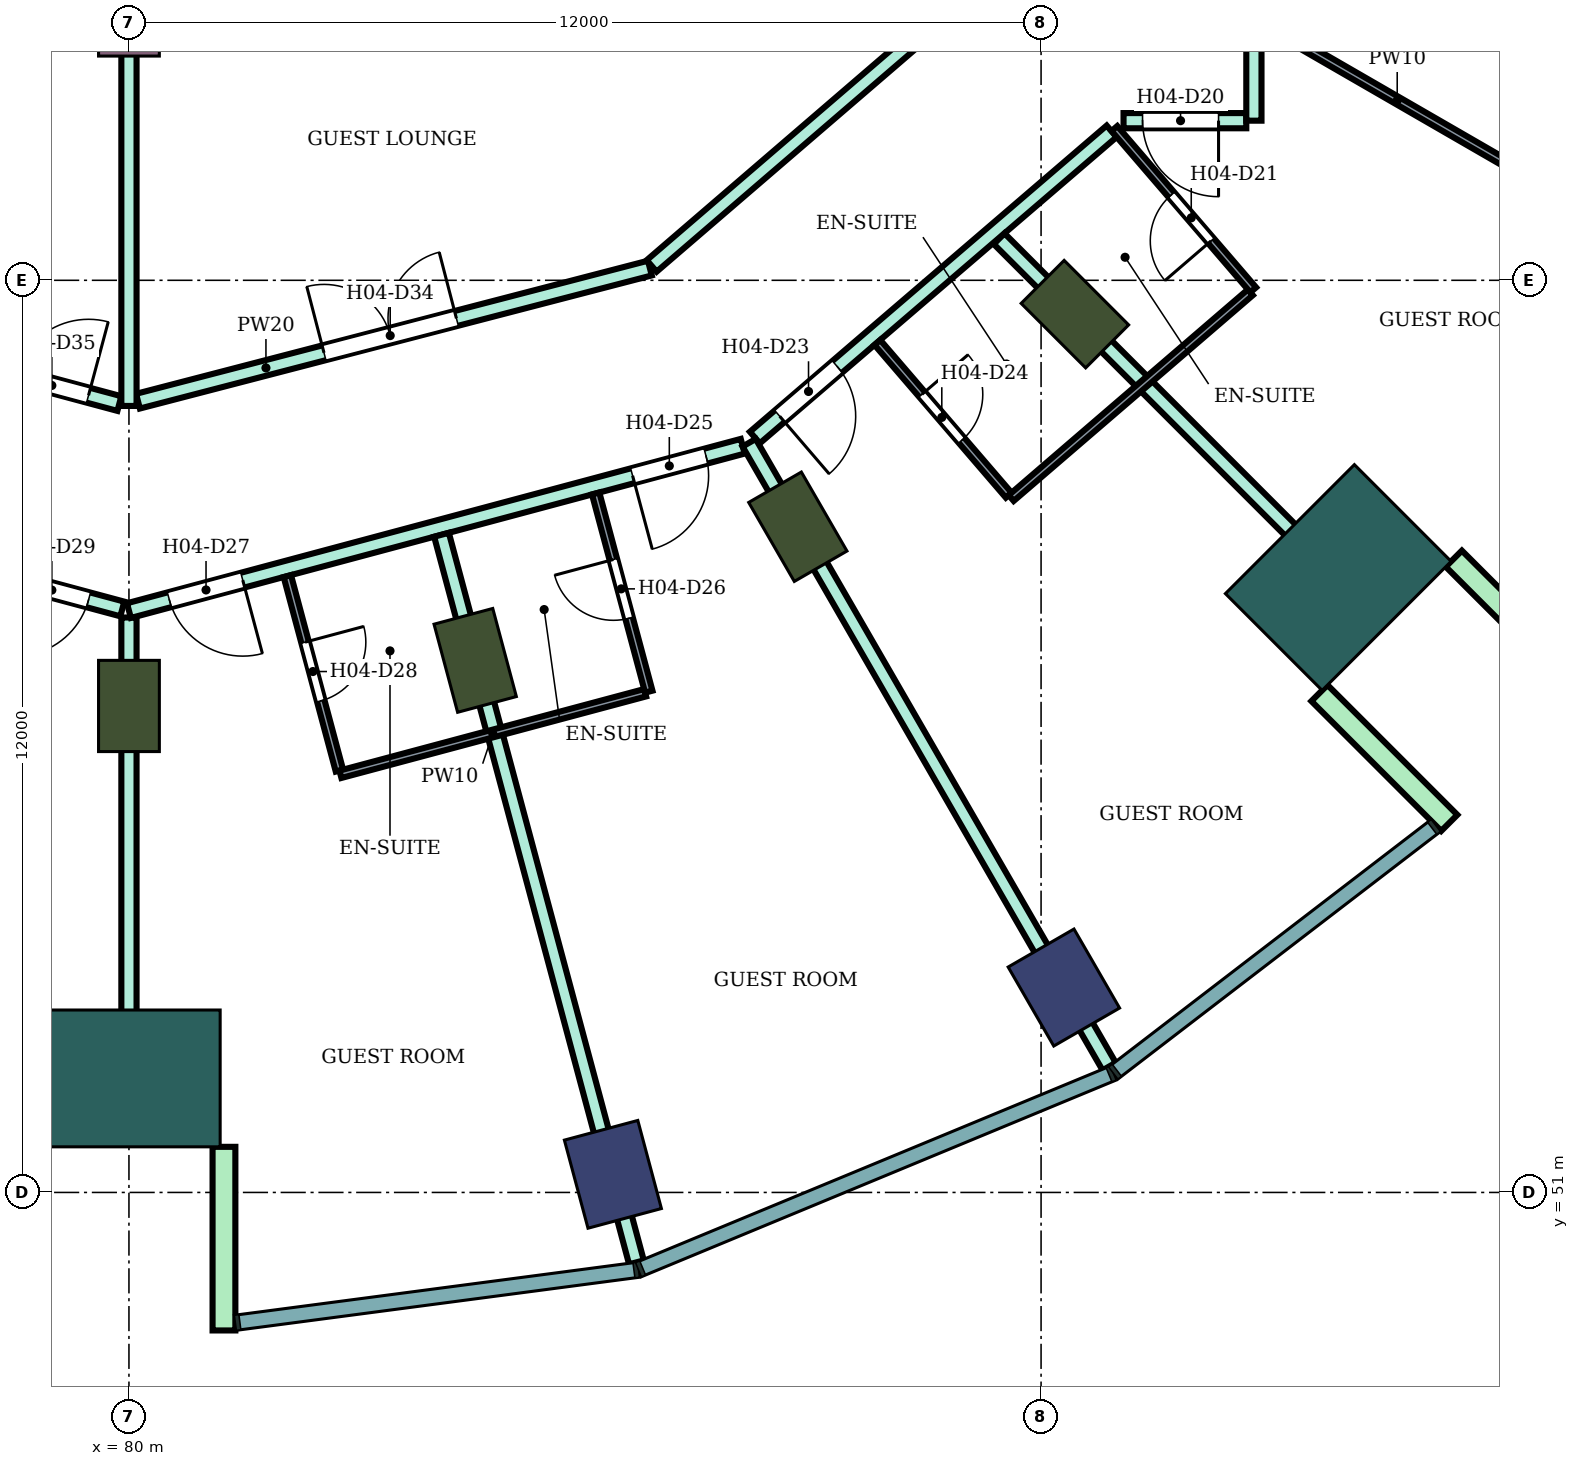
"""IFC4 building model, lengths in metres.
Left out: names, types, materials, properties, quantities, classifications, styles, units other than length and angle.
Written with IfcOpenShell. Run it as: python <this file> out.ifc"""

import sys

from ifc_helpers import new_model, si_unit, direction, frame, frame_2d, origin, origin_2d, place, context, subcontext, project, spatial, rectangle, extrude, element, fill, save


model = new_model("IFC4")
c1 = context("Model", 3, precision=1e-05, world=origin(), true_north=direction((0.0, 1.0)))
c2 = subcontext(c1, "Body", "Model", "MODEL_VIEW")
j1 = project(units=[si_unit("LENGTHUNIT", "METRE"), si_unit("PLANEANGLEUNIT", "RADIAN")], contexts=[c1])
p1 = place(None, origin())
s1 = spatial("IfcSite", under=j1, at=p1, CompositionType="ELEMENT")
p2 = place(p1, origin())
s2 = spatial("IfcBuilding", under=s1, at=p2, CompositionType="ELEMENT")
p3 = place(p2, frame((0.0, 0.0, 63.0)))
s3 = spatial("IfcBuildingStorey", under=s2, at=p3, CompositionType="ELEMENT", Elevation=63.0)
for number, where, z_axis, x_axis in (
    (1, (86.367, 51.238, 0.0), (0.0, 0.0, 1.0), (0.259, -0.966, 0.0)),
    (2, (92.3, 53.696, 0.0), (0.0, 0.0, 1.0), (0.5, -0.866, 0.0)),
):
    element("IfcColumn", number, at=place(p3, frame(where, z_axis=z_axis, x_axis=x_axis)), inside=s3, PredefinedType="COLUMN", context=c2, shape_type="SweptSolid", body=[
        extrude(rectangle(XDim=1.2, YDim=1.0, at=origin_2d()), origin(), (0.0, 0.0, 1.0), 3.8),
    ])
for number, where, z_axis, x_axis in (
    (3, (80.0, 57.4, 0.0), (0.0, 0.0, 1.0), (0.0, -1.0, 0.0)),
    (4, (84.555, 58.0, 0.0), (0.0, 0.0, 1.0), (0.259, -0.966, 0.0)),
    (5, (88.8, 59.758, 0.0), (0.0, 0.0, 1.0), (0.5, -0.866, 0.0)),
    (6, (92.445, 62.555, 0.0), (0.0, 0.0, 1.0), (0.707, -0.707, 0.0)),
):
    element("IfcColumn", number, at=place(p3, frame(where, z_axis=z_axis, x_axis=x_axis)), inside=s3, PredefinedType="COLUMN", context=c2, shape_type="SweptSolid", body=[
        extrude(rectangle(XDim=1.2, YDim=0.8, at=origin_2d()), origin(), (0.0, 0.0, 1.0), 3.8),
    ])
p4 = place(p3, frame((80.0, 66.4, 0.0), z_axis=(0.0, 0.0, 1.0), x_axis=(0.0, -1.0, 0.0)))
e7 = element("IfcColumn", 7, at=p4, inside=s3, PredefinedType="COLUMN", context=c2, shape_type="SweptSolid", body=[
    extrude(rectangle(XDim=0.9, YDim=0.8, at=origin_2d()), origin(), (0.0, 0.0, 1.0), 3.8),
])
for number, where, z_axis, x_axis in (
    (8, (80.0, 52.5, 0.0), (0.0, 0.0, 1.0), (0.0, -1.0, 0.0)),
    (9, (95.91, 59.09, 0.0), (0.0, 0.0, 1.0), (0.707, -0.707, 0.0)),
):
    element("IfcColumn", number, at=place(p3, frame(where, z_axis=z_axis, x_axis=x_axis)), inside=s3, PredefinedType="COLUMN", context=c2, shape_type="SweptSolid", body=[
        extrude(rectangle(XDim=1.8, YDim=2.4, at=origin_2d()), origin(), (0.0, 0.0, 1.0), 3.8),
    ])
for number, where, z_axis, x_axis in (
    (10, (81.25, 51.6, 0.0), (0.0, 0.0, 1.0), (0.0, -1.0, 0.0)),
    (11, (95.662, 57.57, 0.0), (0.0, 0.0, 1.0), (0.707, -0.707, 0.0)),
    (12, (97.43, 59.338, 0.0), (0.0, 0.0, 1.0), (0.707, -0.707, 0.0)),
):
    element("IfcWall", number, at=place(p3, frame(where, z_axis=z_axis, x_axis=x_axis)), inside=s3, PredefinedType="NOTDEFINED", context=c2, shape_type="SweptSolid", body=[
        extrude(rectangle(XDim=2.416, YDim=0.3, at=frame_2d((1.208, 0.0))), origin(), (0.0, 0.0, 1.0), 3.8),
    ])
p5 = place(p3, frame((71.877, 60.832, 0.0), z_axis=(0.0, 0.0, 1.0), x_axis=(0.965852509869, -0.259092510851, 0.0)))
e13 = element("IfcWall", 13, at=p5, inside=s3, PredefinedType="PARTITIONING", context=c2, shape_type="SweptSolid", body=[
    extrude(rectangle(XDim=8.32, YDim=0.2, at=frame_2d((4.16, 0.0))), origin(), (0.0, 0.0, 1.0), 3.35),
])
p6 = place(p5, frame((6.86, 0.0, 0.0)))
e14 = element("IfcOpeningElement", 14, at=p6, cuts=e13, PredefinedType="OPENING", context=c2, shape_type="SweptSolid", body=[
    extrude(rectangle(XDim=1.0, YDim=2.1, at=frame_2d((0.5, 1.05))), frame((0.0, 0.11, 0.0), z_axis=(0.0, -1.0, 0.0), x_axis=(1.0, 0.0, 0.0)), (0.0, 0.0, 1.0), 0.22),
])
p7 = place(p5, frame((0.55, 0.0, 0.0)))
e15 = element("IfcOpeningElement", 15, at=p7, cuts=e13, PredefinedType="OPENING", context=c2, shape_type="SweptSolid", body=[
    extrude(rectangle(XDim=1.0, YDim=2.1, at=frame_2d((0.5, 1.05))), frame((0.0, 0.11, 0.0), z_axis=(0.0, -1.0, 0.0), x_axis=(1.0, 0.0, 0.0)), (0.0, 0.0, 1.0), 0.22),
])
p8 = place(p3, frame((73.297, 63.143, 0.0), z_axis=(0.0, 0.0, 1.0), x_axis=(0.965859030528, -0.25906820173, 0.0)))
e16 = element("IfcWall", 16, at=p8, inside=s3, PredefinedType="PARTITIONING", context=c2, shape_type="SweptSolid", body=[
    extrude(rectangle(XDim=6.81, YDim=0.2, at=frame_2d((3.405, 0.0))), origin(), (0.0, 0.0, 1.0), 3.35),
])
p9 = place(p8, frame((5.39, 0.0, 0.0)))
e17 = element("IfcOpeningElement", 17, at=p9, cuts=e16, PredefinedType="OPENING", context=c2, shape_type="SweptSolid", body=[
    extrude(rectangle(XDim=1.0, YDim=2.1, at=frame_2d((0.5, 1.05))), frame((0.0, 0.11, 0.0), z_axis=(0.0, -1.0, 0.0), x_axis=(1.0, 0.0, 0.0)), (0.0, 0.0, 1.0), 0.22),
])
p10 = place(p3, frame((80.119, 61.41, 0.0), z_axis=(0.0, 0.0, 1.0), x_axis=(0.967823361235, 0.251630565408, 0.0)))
e18 = element("IfcWall", 18, at=p10, inside=s3, PredefinedType="PARTITIONING", context=c2, shape_type="SweptSolid", body=[
    extrude(rectangle(XDim=6.958, YDim=0.2, at=frame_2d((3.479, 0.0))), origin(), (0.0, 0.0, 1.0), 3.35),
])
p11 = place(p10, frame((2.529, 0.0, 0.0)))
e19 = element("IfcOpeningElement", 19, at=p11, cuts=e18, PredefinedType="OPENING", context=c2, shape_type="SweptSolid", body=[
    extrude(rectangle(XDim=1.8, YDim=2.1, at=frame_2d((0.9, 1.05))), frame((0.0, 0.11, 0.0), z_axis=(0.0, -1.0, 0.0), x_axis=(1.0, 0.0, 0.0)), (0.0, 0.0, 1.0), 0.22),
])
p12 = place(p3, frame((80.0, 51.8, 0.0), z_axis=(0.0, 0.0, 1.0), x_axis=(0.0, 1.0, 0.0)))
e20 = element("IfcWall", 20, at=p12, inside=s3, PredefinedType="PARTITIONING", context=c2, shape_type="SweptSolid", body=[
    extrude(rectangle(XDim=6.764, YDim=0.2, at=frame_2d((3.382, 0.0))), origin(), (0.0, 0.0, 1.0), 3.35),
])
p13 = place(p3, frame((80.0, 58.655, 0.0), z_axis=(0.0, 0.0, 1.0), x_axis=(0.965974635626, 0.258636817424, 0.0)))
e21 = element("IfcWall", 21, at=p13, inside=s3, PredefinedType="PARTITIONING", context=c2, shape_type="SweptSolid", body=[
    extrude(rectangle(XDim=8.36, YDim=0.2, at=frame_2d((4.18, 0.0))), origin(), (0.0, 0.0, 1.0), 3.35),
])
p14 = place(p13, frame((6.86, 0.0, 0.0)))
e22 = element("IfcOpeningElement", 22, at=p14, cuts=e21, PredefinedType="OPENING", context=c2, shape_type="SweptSolid", body=[
    extrude(rectangle(XDim=1.0, YDim=2.1, at=frame_2d((0.5, 1.05))), frame((0.0, 0.11, 0.0), z_axis=(0.0, -1.0, 0.0), x_axis=(1.0, 0.0, 0.0)), (0.0, 0.0, 1.0), 0.22),
])
p15 = place(p13, frame((0.55, 0.0, 0.0)))
e23 = element("IfcOpeningElement", 23, at=p15, cuts=e21, PredefinedType="OPENING", context=c2, shape_type="SweptSolid", body=[
    extrude(rectangle(XDim=1.0, YDim=2.1, at=frame_2d((0.5, 1.05))), frame((0.0, 0.11, 0.0), z_axis=(0.0, -1.0, 0.0), x_axis=(1.0, 0.0, 0.0)), (0.0, 0.0, 1.0), 0.22),
])
p16 = place(p3, frame((80.0, 61.347, 0.0), z_axis=(0.0, 0.0, 1.0), x_axis=(0.0, 1.0, 0.0)))
e24 = element("IfcWall", 24, at=p16, inside=s3, PredefinedType="PARTITIONING", context=c2, shape_type="SweptSolid", body=[
    extrude(rectangle(XDim=5.953, YDim=0.2, at=frame_2d((2.977, 0.0))), origin(), (0.0, 0.0, 1.0), 3.35),
])
p17 = place(p3, frame((84.112, 59.652, 0.0), z_axis=(0.0, 0.0, 1.0), x_axis=(0.258791091927, -0.965933315886, 0.0)))
e25 = element("IfcWall", 25, at=p17, inside=s3, PredefinedType="PARTITIONING", context=c2, shape_type="SweptSolid", body=[
    extrude(rectangle(XDim=9.909, YDim=0.2, at=frame_2d((4.955, 0.0))), origin(), (0.0, 0.0, 1.0), 3.35),
])
p18 = place(p3, frame((86.877, 63.189, 0.0), z_axis=(0.0, 0.0, 1.0), x_axis=(0.758088707506, 0.652151448325, 0.0)))
e26 = element("IfcWall", 26, at=p18, inside=s3, PredefinedType="PARTITIONING", context=c2, shape_type="SweptSolid", body=[
    extrude(rectangle(XDim=5.229, YDim=0.2, at=frame_2d((2.615, 0.0))), origin(), (0.0, 0.0, 1.0), 3.35),
])
p19 = place(p3, frame((88.235, 60.931, 0.0), z_axis=(0.0, 0.0, 1.0), x_axis=(0.758799498714, 0.651324282329, 0.0)))
e27 = element("IfcWall", 27, at=p19, inside=s3, PredefinedType="PARTITIONING", context=c2, shape_type="SweptSolid", body=[
    extrude(rectangle(XDim=6.186, YDim=0.2, at=frame_2d((3.093, 0.0))), origin(), (0.0, 0.0, 1.0), 3.35),
])
p20 = place(p19, frame((0.43, 0.0, 0.0)))
e28 = element("IfcOpeningElement", 28, at=p20, cuts=e27, PredefinedType="OPENING", context=c2, shape_type="SweptSolid", body=[
    extrude(rectangle(XDim=1.0, YDim=2.1, at=frame_2d((0.5, 1.05))), frame((0.0, 0.11, 0.0), z_axis=(0.0, -1.0, 0.0), x_axis=(1.0, 0.0, 0.0)), (0.0, 0.0, 1.0), 0.22),
])
p21 = place(p3, frame((88.159, 60.863, 0.0), z_axis=(0.0, 0.0, 1.0), x_axis=(0.499935840196, -0.866062443296, 0.0)))
e29 = element("IfcWall", 29, at=p21, inside=s3, PredefinedType="PARTITIONING", context=c2, shape_type="SweptSolid", body=[
    extrude(rectangle(XDim=9.475, YDim=0.2, at=frame_2d((4.737, 0.0))), origin(), (0.0, 0.0, 1.0), 3.35),
])
p22 = place(p3, frame((91.448, 63.547, 0.0), z_axis=(0.0, 0.0, 1.0), x_axis=(0.706984810649, -0.707228730688, 0.0)))
e30 = element("IfcWall", 30, at=p22, inside=s3, PredefinedType="PARTITIONING", context=c2, shape_type="SweptSolid", body=[
    extrude(rectangle(XDim=7.006, YDim=0.2, at=frame_2d((3.503, 0.0))), origin(), (0.0, 0.0, 1.0), 3.35),
])
p23 = place(p3, frame((93.085, 65.1, 0.0), z_axis=(0.0, 0.0, 1.0), x_axis=(1.0, 0.0, 0.0)))
e31 = element("IfcWall", 31, at=p23, inside=s3, PredefinedType="PARTITIONING", context=c2, shape_type="SweptSolid", body=[
    extrude(rectangle(XDim=1.615, YDim=0.2, at=frame_2d((0.808, 0.0))), origin(), (0.0, 0.0, 1.0), 3.35),
])
p24 = place(p23, frame((0.25, 0.0, 0.0)))
e32 = element("IfcOpeningElement", 32, at=p24, cuts=e31, PredefinedType="OPENING", context=c2, shape_type="SweptSolid", body=[
    extrude(rectangle(XDim=1.0, YDim=2.1, at=frame_2d((0.5, 1.05))), frame((0.0, 0.11, 0.0), z_axis=(0.0, -1.0, 0.0), x_axis=(1.0, 0.0, 0.0)), (0.0, 0.0, 1.0), 0.22),
])
p25 = place(p3, frame((94.8, 65.1, 0.0), z_axis=(0.0, 0.0, 1.0), x_axis=(0.0, 1.0, 0.0)))
e33 = element("IfcWall", 33, at=p25, inside=s3, PredefinedType="PARTITIONING", context=c2, shape_type="SweptSolid", body=[
    extrude(rectangle(XDim=1.25, YDim=0.2, at=frame_2d((0.625, 0.0))), origin(), (0.0, 0.0, 1.0), 3.35),
])
p26 = place(p3, frame((82.084, 59.108, 0.0), z_axis=(0.0, 0.0, 1.0), x_axis=(0.258591746437, -0.965986702121, 0.0)))
e34 = element("IfcWall", 34, at=p26, inside=s3, PredefinedType="PARTITIONING", context=c2, shape_type="SweptSolid", body=[
    extrude(rectangle(XDim=2.649, YDim=0.1, at=frame_2d((1.325, 0.0))), origin(), (0.0, 0.0, 1.0), 3.35),
])
p27 = place(p26, frame((0.9, 0.0, 0.0)))
e35 = element("IfcOpeningElement", 35, at=p27, cuts=e34, PredefinedType="OPENING", context=c2, shape_type="SweptSolid", body=[
    extrude(rectangle(XDim=0.8, YDim=2.1, at=frame_2d((0.4, 1.05))), frame((0.0, 0.06, 0.0), z_axis=(0.0, -1.0, 0.0), x_axis=(1.0, 0.0, 0.0)), (0.0, 0.0, 1.0), 0.12),
])
p28 = place(p3, frame((82.782, 56.501, 0.0), z_axis=(0.0, 0.0, 1.0), x_axis=(0.965999228418, 0.258544949083, 0.0)))
e36 = element("IfcWall", 36, at=p28, inside=s3, PredefinedType="PARTITIONING", context=c2, shape_type="SweptSolid", body=[
    extrude(rectangle(XDim=4.15, YDim=0.1, at=frame_2d((2.075, 0.0))), origin(), (0.0, 0.0, 1.0), 3.35),
])
p29 = place(p3, frame((86.14, 60.196, 0.0), z_axis=(0.0, 0.0, 1.0), x_axis=(0.258945475746, -0.965891940432, 0.0)))
e37 = element("IfcWall", 37, at=p29, inside=s3, PredefinedType="PARTITIONING", context=c2, shape_type="SweptSolid", body=[
    extrude(rectangle(XDim=2.7, YDim=0.1, at=frame_2d((1.35, 0.0))), origin(), (0.0, 0.0, 1.0), 3.35),
])
p30 = place(p29, frame((0.9, 0.0, 0.0)))
e38 = element("IfcOpeningElement", 38, at=p30, cuts=e37, PredefinedType="OPENING", context=c2, shape_type="SweptSolid", body=[
    extrude(rectangle(XDim=0.8, YDim=2.1, at=frame_2d((0.4, 1.05))), frame((0.0, 0.06, 0.0), z_axis=(0.0, -1.0, 0.0), x_axis=(1.0, 0.0, 0.0)), (0.0, 0.0, 1.0), 0.12),
])
p31 = place(p3, frame((89.846, 62.182, 0.0), z_axis=(0.0, 0.0, 1.0), x_axis=(0.652095405055, -0.758136915541, 0.0)))
e39 = element("IfcWall", 39, at=p31, inside=s3, PredefinedType="PARTITIONING", context=c2, shape_type="SweptSolid", body=[
    extrude(rectangle(XDim=2.65, YDim=0.1, at=frame_2d((1.325, 0.0))), origin(), (0.0, 0.0, 1.0), 3.35),
])
p32 = place(p31, frame((0.9, 0.0, 0.0)))
e40 = element("IfcOpeningElement", 40, at=p32, cuts=e39, PredefinedType="OPENING", context=c2, shape_type="SweptSolid", body=[
    extrude(rectangle(XDim=0.8, YDim=2.1, at=frame_2d((0.4, 1.05))), frame((0.0, 0.06, 0.0), z_axis=(0.0, -1.0, 0.0), x_axis=(1.0, 0.0, 0.0)), (0.0, 0.0, 1.0), 0.12),
])
p33 = place(p3, frame((91.607, 60.135, 0.0), z_axis=(0.0, 0.0, 1.0), x_axis=(0.758121792225, 0.65211298726, 0.0)))
e41 = element("IfcWall", 41, at=p33, inside=s3, PredefinedType="PARTITIONING", context=c2, shape_type="SweptSolid", body=[
    extrude(rectangle(XDim=4.15, YDim=0.1, at=frame_2d((2.075, 0.0))), origin(), (0.0, 0.0, 1.0), 3.35),
])
p34 = place(p3, frame((92.965, 64.997, 0.0), z_axis=(0.0, 0.0, 1.0), x_axis=(0.652104424393, -0.758129157655, 0.0)))
e42 = element("IfcWall", 42, at=p34, inside=s3, PredefinedType="PARTITIONING", context=c2, shape_type="SweptSolid", body=[
    extrude(rectangle(XDim=2.8, YDim=0.1, at=frame_2d((1.4, 0.0))), origin(), (0.0, 0.0, 1.0), 3.35),
])
p35 = place(p34, frame((1.15, 0.0, 0.0)))
e43 = element("IfcOpeningElement", 43, at=p35, cuts=e42, PredefinedType="OPENING", context=c2, shape_type="SweptSolid", body=[
    extrude(rectangle(XDim=0.8, YDim=2.1, at=frame_2d((0.4, 1.05))), frame((0.0, 0.06, 0.0), z_axis=(0.0, -1.0, 0.0), x_axis=(1.0, 0.0, 0.0)), (0.0, 0.0, 1.0), 0.12),
])
p36 = place(p3, frame((94.8, 66.455, 0.0), z_axis=(0.0, 0.0, 1.0), x_axis=(0.86602264145, -0.500004784474, 0.0)))
e44 = element("IfcWall", 44, at=p36, inside=s3, PredefinedType="PARTITIONING", context=c2, shape_type="SweptSolid", body=[
    extrude(rectangle(XDim=8.708, YDim=0.1, at=frame_2d((4.354, 0.0))), origin(), (0.0, 0.0, 1.0), 3.35),
])
p37 = place(p36, frame((3.879, 0.0, 0.0)))
e45 = element("IfcOpeningElement", 45, at=p37, cuts=e44, PredefinedType="OPENING", context=c2, shape_type="SweptSolid", body=[
    extrude(rectangle(XDim=0.9, YDim=2.1, at=frame_2d((0.45, 1.05))), frame((0.0, 0.06, 0.0), z_axis=(0.0, -1.0, 0.0), x_axis=(1.0, 0.0, 0.0)), (0.0, 0.0, 1.0), 0.12),
])
p38 = place(p24, frame((1.0, 0.0, 0.0), z_axis=(0.0, 0.0, 1.0), x_axis=(-1.0, 0.0, 0.0)))
e46 = element("IfcDoor", 46, at=p38, inside=s3, OperationType="SINGLE_SWING_LEFT", PredefinedType="DOOR", context=c2, shape_type="SweptSolid", body=[
    extrude(rectangle(XDim=1.0, YDim=2.1, at=frame_2d((0.5, 1.05))), frame((0.0, 0.025, 0.0), z_axis=(0.0, -1.0, 0.0), x_axis=(1.0, 0.0, 0.0)), (0.0, 0.0, 1.0), 0.05),
])
fill(e32, e46)
p39 = place(p35, frame((0.8, 0.0, 0.0), z_axis=(0.0, 0.0, 1.0), x_axis=(-1.0, 0.0, 0.0)))
e47 = element("IfcDoor", 47, at=p39, inside=s3, OperationType="SINGLE_SWING_LEFT", PredefinedType="DOOR", context=c2, shape_type="SweptSolid", body=[
    extrude(rectangle(XDim=0.8, YDim=2.1, at=frame_2d((0.4, 1.05))), frame((0.0, 0.025, 0.0), z_axis=(0.0, -1.0, 0.0), x_axis=(1.0, 0.0, 0.0)), (0.0, 0.0, 1.0), 0.05),
])
fill(e43, e47)
p40 = place(p20, frame((1.0, 0.0, 0.0), z_axis=(0.0, 0.0, 1.0), x_axis=(-1.0, 0.0, 0.0)))
e48 = element("IfcDoor", 48, at=p40, inside=s3, OperationType="SINGLE_SWING_RIGHT", PredefinedType="DOOR", context=c2, shape_type="SweptSolid", body=[
    extrude(rectangle(XDim=1.0, YDim=2.1, at=frame_2d((0.5, 1.05))), frame((0.0, 0.025, 0.0), z_axis=(0.0, -1.0, 0.0), x_axis=(1.0, 0.0, 0.0)), (0.0, 0.0, 1.0), 0.05),
])
fill(e28, e48)
p41 = place(p32, origin())
e49 = element("IfcDoor", 49, at=p41, inside=s3, OperationType="SINGLE_SWING_LEFT", PredefinedType="DOOR", context=c2, shape_type="SweptSolid", body=[
    extrude(rectangle(XDim=0.8, YDim=2.1, at=frame_2d((0.4, 1.05))), frame((0.0, 0.025, 0.0), z_axis=(0.0, -1.0, 0.0), x_axis=(1.0, 0.0, 0.0)), (0.0, 0.0, 1.0), 0.05),
])
fill(e40, e49)
p42 = place(p14, frame((1.0, 0.0, 0.0), z_axis=(0.0, 0.0, 1.0), x_axis=(-1.0, 0.0, 0.0)))
e50 = element("IfcDoor", 50, at=p42, inside=s3, OperationType="SINGLE_SWING_RIGHT", PredefinedType="DOOR", context=c2, shape_type="SweptSolid", body=[
    extrude(rectangle(XDim=1.0, YDim=2.1, at=frame_2d((0.5, 1.05))), frame((0.0, 0.025, 0.0), z_axis=(0.0, -1.0, 0.0), x_axis=(1.0, 0.0, 0.0)), (0.0, 0.0, 1.0), 0.05),
])
fill(e22, e50)
p43 = place(p30, frame((0.8, 0.0, 0.0), z_axis=(0.0, 0.0, 1.0), x_axis=(-1.0, 0.0, 0.0)))
e51 = element("IfcDoor", 51, at=p43, inside=s3, OperationType="SINGLE_SWING_RIGHT", PredefinedType="DOOR", context=c2, shape_type="SweptSolid", body=[
    extrude(rectangle(XDim=0.8, YDim=2.1, at=frame_2d((0.4, 1.05))), frame((0.0, 0.025, 0.0), z_axis=(0.0, -1.0, 0.0), x_axis=(1.0, 0.0, 0.0)), (0.0, 0.0, 1.0), 0.05),
])
fill(e38, e51)
p44 = place(p15, frame((1.0, 0.0, 0.0), z_axis=(0.0, 0.0, 1.0), x_axis=(-1.0, 0.0, 0.0)))
e52 = element("IfcDoor", 52, at=p44, inside=s3, OperationType="SINGLE_SWING_LEFT", PredefinedType="DOOR", context=c2, shape_type="SweptSolid", body=[
    extrude(rectangle(XDim=1.0, YDim=2.1, at=frame_2d((0.5, 1.05))), frame((0.0, 0.025, 0.0), z_axis=(0.0, -1.0, 0.0), x_axis=(1.0, 0.0, 0.0)), (0.0, 0.0, 1.0), 0.05),
])
fill(e23, e52)
p45 = place(p27, origin())
e53 = element("IfcDoor", 53, at=p45, inside=s3, OperationType="SINGLE_SWING_LEFT", PredefinedType="DOOR", context=c2, shape_type="SweptSolid", body=[
    extrude(rectangle(XDim=0.8, YDim=2.1, at=frame_2d((0.4, 1.05))), frame((0.0, 0.025, 0.0), z_axis=(0.0, -1.0, 0.0), x_axis=(1.0, 0.0, 0.0)), (0.0, 0.0, 1.0), 0.05),
])
fill(e35, e53)
p46 = place(p6, frame((1.0, 0.0, 0.0), z_axis=(0.0, 0.0, 1.0), x_axis=(-1.0, 0.0, 0.0)))
e54 = element("IfcDoor", 54, at=p46, inside=s3, OperationType="SINGLE_SWING_RIGHT", PredefinedType="DOOR", context=c2, shape_type="SweptSolid", body=[
    extrude(rectangle(XDim=1.0, YDim=2.1, at=frame_2d((0.5, 1.05))), frame((0.0, 0.025, 0.0), z_axis=(0.0, -1.0, 0.0), x_axis=(1.0, 0.0, 0.0)), (0.0, 0.0, 1.0), 0.05),
])
fill(e14, e54)
p47 = place(p11, origin())
e55 = element("IfcDoor", 55, at=p47, inside=s3, OperationType="DOUBLE_DOOR_SINGLE_SWING", PredefinedType="DOOR", context=c2, shape_type="SweptSolid", body=[
    extrude(rectangle(XDim=1.8, YDim=2.1, at=frame_2d((0.9, 1.05))), frame((0.0, 0.025, 0.0), z_axis=(0.0, -1.0, 0.0), x_axis=(1.0, 0.0, 0.0)), (0.0, 0.0, 1.0), 0.05),
])
fill(e19, e55)
p48 = place(p9, origin())
e56 = element("IfcDoor", 56, at=p48, inside=s3, OperationType="SINGLE_SWING_RIGHT", PredefinedType="DOOR", context=c2, shape_type="SweptSolid", body=[
    extrude(rectangle(XDim=1.0, YDim=2.1, at=frame_2d((0.5, 1.05))), frame((0.0, 0.025, 0.0), z_axis=(0.0, -1.0, 0.0), x_axis=(1.0, 0.0, 0.0)), (0.0, 0.0, 1.0), 0.05),
])
fill(e17, e56)
save(model, sys.argv[1])
